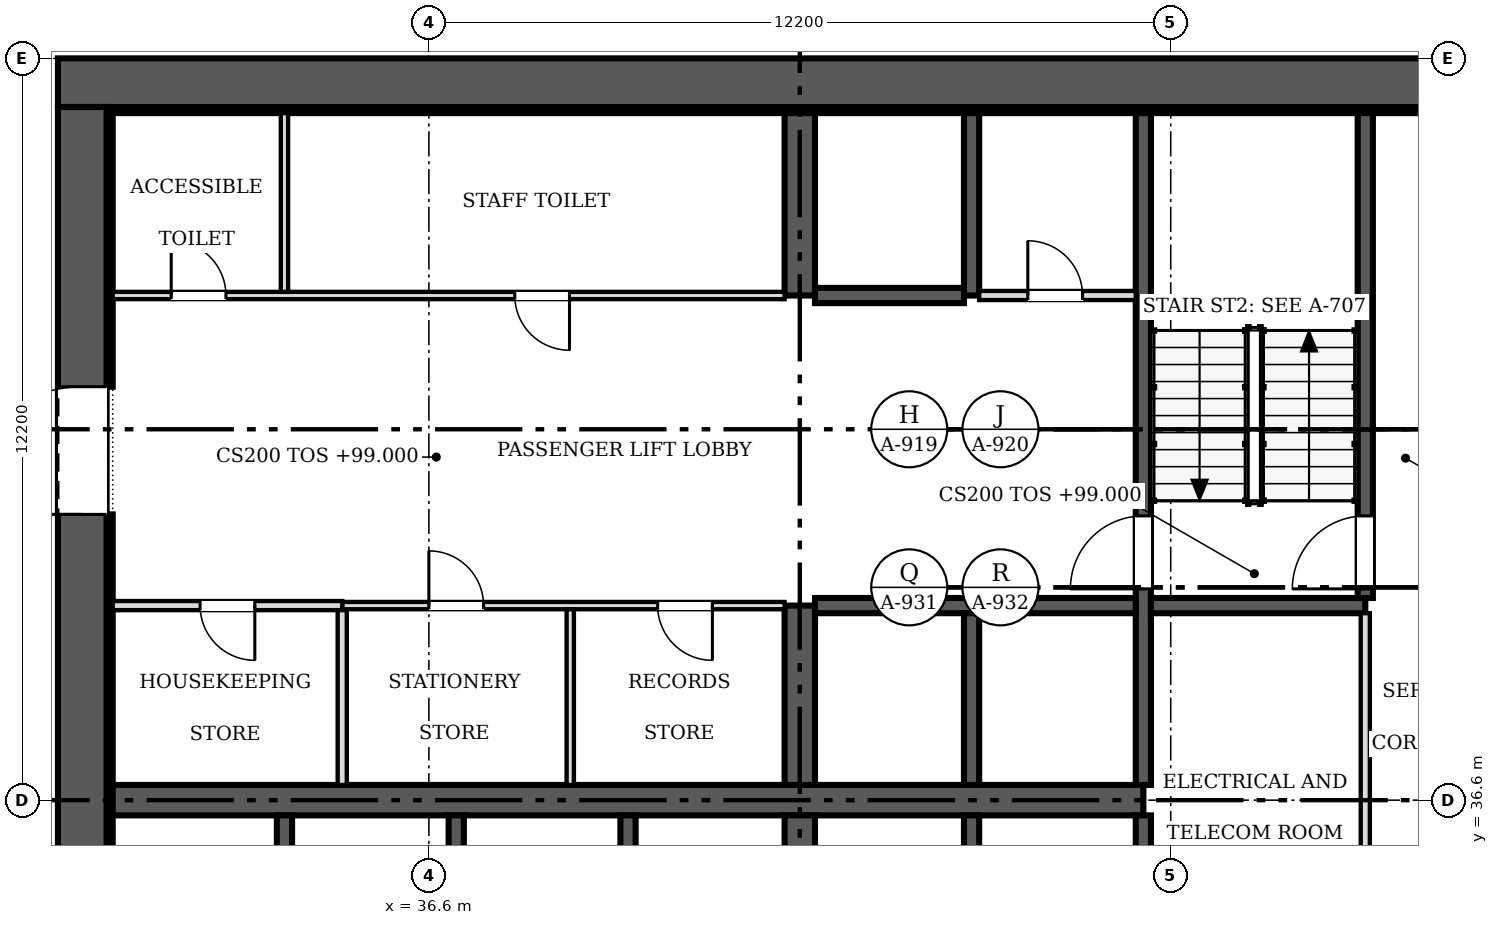
"""IFC4 building model, lengths in metres.
Left out: names, types, materials, properties, quantities, classifications, styles, units other than length and angle.
Written with IfcOpenShell. Run it as: python <this file> out.ifc"""

import sys

from ifc_helpers import new_model, si_unit, direction, frame, frame_2d, origin, place, context, subcontext, project, spatial, rectangle, extrude, source, transform, mapped, element, fill, save


model = new_model("IFC4")
c1 = context("Model", 3, precision=1e-05, world=origin(), true_north=direction((0.0, 1.0)))
c2 = subcontext(c1, "Body", "Model", "MODEL_VIEW")
j1 = project(units=[si_unit("LENGTHUNIT", "METRE"), si_unit("PLANEANGLEUNIT", "RADIAN")], contexts=[c1])
p1 = place(None, origin())
s1 = spatial("IfcSite", under=j1, at=p1, CompositionType="ELEMENT")
p2 = place(p1, origin())
s2 = spatial("IfcBuilding", under=s1, at=p2, CompositionType="ELEMENT")
p3 = place(p2, frame((0.0, 0.0, 99.0)))
s3 = spatial("IfcBuildingStorey", under=s2, at=p3, CompositionType="ELEMENT", Elevation=99.0)
p4 = place(p3, frame((30.9, 25.2, 0.0), z_axis=(0.0, 0.0, 1.0), x_axis=(0.0, 1.0, 0.0)))
e1 = element("IfcWall", 1, at=p4, inside=s3, PredefinedType="SHEAR", context=c2, shape_type="SweptSolid", body=[
    extrude(rectangle(XDim=22.8, YDim=0.8, at=frame_2d((11.4, 0.0))), origin(), (0.0, 0.0, 1.0), 3.8),
])
m1 = source(origin(), c2, "Body", "SweptSolid", [
    extrude(rectangle(XDim=2.1, YDim=2.4, at=frame_2d((1.05, 1.2))), frame((0.0, 0.41, 0.0), z_axis=(0.0, -1.0, 0.0), x_axis=(1.0, 0.0, 0.0)), (0.0, 0.0, 1.0), 0.82),
])
p5 = place(p4, frame((4.6, 0.0, 0.0)))
e2 = element("IfcOpeningElement", 2, at=p5, cuts=e1, PredefinedType="OPENING", context=c2, shape_type="MappedRepresentation", body=[
    mapped(m1, transform((0.0, 0.0, 0.0), scale=1.0)),
])
p6 = place(p4, frame((16.1, 0.0, 0.0)))
e3 = element("IfcOpeningElement", 3, at=p6, cuts=e1, PredefinedType="OPENING", context=c2, shape_type="MappedRepresentation", body=[
    mapped(m1, transform((0.0, 0.0, 0.0), scale=1.0)),
])
p7 = place(p3, frame((30.5, 48.4, 0.0), z_axis=(0.0, 0.0, 1.0), x_axis=(1.0, 0.0, 0.0)))
e4 = element("IfcWall", 4, at=p7, inside=s3, PredefinedType="SHEAR", context=c2, shape_type="SweptSolid", body=[
    extrude(rectangle(XDim=24.4, YDim=0.8, at=frame_2d((12.2, 0.0))), origin(), (0.0, 0.0, 1.0), 3.8),
])
p8 = place(p3, frame((31.3, 47.95, 0.0), z_axis=(0.0, 0.0, 1.0), x_axis=(1.0, 0.0, 0.0)))
e5 = element("IfcWall", 5, at=p8, inside=s3, PredefinedType="SOLIDWALL", context=c2, shape_type="SweptSolid", body=[
    extrude(rectangle(XDim=22.8, YDim=0.1, at=frame_2d((11.4, 0.0))), origin(), (0.0, 0.0, 1.0), 3.8),
])
p9 = place(p3, frame((31.35, 31.9, 0.0), z_axis=(0.0, 0.0, 1.0), x_axis=(0.0, 1.0, 0.0)))
e6 = element("IfcWall", 6, at=p9, inside=s3, PredefinedType="SOLIDWALL", context=c2, shape_type="SweptSolid", body=[
    extrude(rectangle(XDim=9.4, YDim=0.1, at=frame_2d((4.7, 0.0))), origin(), (0.0, 0.0, 1.0), 3.8),
])
p10 = place(p3, frame((31.35, 43.4, 0.0), z_axis=(0.0, 0.0, 1.0), x_axis=(0.0, 1.0, 0.0)))
e7 = element("IfcWall", 7, at=p10, inside=s3, PredefinedType="SOLIDWALL", context=c2, shape_type="SweptSolid", body=[
    extrude(rectangle(XDim=4.5, YDim=0.1, at=frame_2d((2.25, 0.0))), origin(), (0.0, 0.0, 1.0), 3.8),
])
p11 = place(p3, frame((31.4, 36.6, 0.0), z_axis=(0.0, 0.0, 1.0), x_axis=(1.0, 0.0, 0.0)))
e8 = element("IfcWall", 8, at=p11, inside=s3, PredefinedType="SHEAR", context=c2, shape_type="SweptSolid", body=[
    extrude(rectangle(XDim=16.95, YDim=0.5, at=frame_2d((8.475, 0.0))), origin(), (0.0, 0.0, 1.0), 3.8),
])
p12 = place(p3, frame((42.7, 36.35, 0.0), z_axis=(0.0, 0.0, 1.0), x_axis=(0.0, -1.0, 0.0)))
e9 = element("IfcWall", 9, at=p12, inside=s3, PredefinedType="SHEAR", context=c2, shape_type="SweptSolid", body=[
    extrude(rectangle(XDim=11.05, YDim=0.5, at=frame_2d((5.525, 0.0))), origin(), (0.0, 0.0, 1.0), 3.8),
])
m2 = source(origin(), c2, "Body", "SweptSolid", [
    extrude(rectangle(XDim=0.9, YDim=2.1, at=frame_2d((0.45, 1.05))), frame((0.0, 0.26, 0.0), z_axis=(0.0, -1.0, 0.0), x_axis=(1.0, 0.0, 0.0)), (0.0, 0.0, 1.0), 0.52),
])
p13 = place(p12, frame((6.5, 0.0, 0.0)))
e10 = element("IfcOpeningElement", 10, at=p13, cuts=e9, PredefinedType="OPENING", context=c2, shape_type="MappedRepresentation", body=[
    mapped(m2, transform((0.0, 0.0, 0.0), scale=1.0)),
])
m3 = source(origin(), c2, "Body", "SweptSolid", [
    extrude(rectangle(XDim=1.1, YDim=2.1, at=frame_2d((0.55, 1.05))), frame((0.0, 0.26, 0.0), z_axis=(0.0, -1.0, 0.0), x_axis=(1.0, 0.0, 0.0)), (0.0, 0.0, 1.0), 0.52),
])
p14 = place(p12, frame((3.8, 0.0, 0.0)))
e11 = element("IfcOpeningElement", 11, at=p14, cuts=e9, PredefinedType="OPENING", context=c2, shape_type="MappedRepresentation", body=[
    mapped(m3, transform((0.0, 0.0, 0.0), scale=1.0)),
])
p15 = place(p3, frame((42.7, 36.85, 0.0), z_axis=(0.0, 0.0, 1.0), x_axis=(0.0, 1.0, 0.0)))
e12 = element("IfcWall", 12, at=p15, inside=s3, PredefinedType="SHEAR", context=c2, shape_type="SweptSolid", body=[
    extrude(rectangle(XDim=2.95, YDim=0.5, at=frame_2d((1.475, 0.0))), origin(), (0.0, 0.0, 1.0), 3.8),
])
p16 = place(p3, frame((42.7, 44.9, 0.0), z_axis=(0.0, 0.0, 1.0), x_axis=(0.0, 1.0, 0.0)))
e13 = element("IfcWall", 13, at=p16, inside=s3, PredefinedType="SHEAR", context=c2, shape_type="SweptSolid", body=[
    extrude(rectangle(XDim=3.0, YDim=0.5, at=frame_2d((1.5, 0.0))), origin(), (0.0, 0.0, 1.0), 3.8),
])
p17 = place(p3, frame((48.35, 36.35, 0.0), z_axis=(0.0, 0.0, 1.0), x_axis=(0.0, -1.0, 0.0)))
e14 = element("IfcWall", 14, at=p17, inside=s3, PredefinedType="SOLIDWALL", context=c2, shape_type="SweptSolid", body=[
    extrude(rectangle(XDim=11.05, YDim=0.25, at=frame_2d((5.525, 0.0))), origin(), (0.0, 0.0, 1.0), 3.8),
])
m4 = source(origin(), c2, "Body", "SweptSolid", [
    extrude(rectangle(XDim=1.2, YDim=2.1, at=frame_2d((0.6, 1.05))), frame((0.0, 0.135, 0.0), z_axis=(0.0, -1.0, 0.0), x_axis=(1.0, 0.0, 0.0)), (0.0, 0.0, 1.0), 0.27),
])
p18 = place(p17, frame((3.225, 0.0, 0.0)))
e15 = element("IfcOpeningElement", 15, at=p18, cuts=e14, PredefinedType="OPENING", context=c2, shape_type="MappedRepresentation", body=[
    mapped(m4, transform((0.0, 0.0, 0.0), scale=1.0)),
])
p19 = place(p3, frame((48.35, 47.9, 0.0), z_axis=(0.0, 0.0, 1.0), x_axis=(0.0, -1.0, 0.0)))
e16 = element("IfcWall", 16, at=p19, inside=s3, PredefinedType="SOLIDWALL", context=c2, shape_type="SweptSolid", body=[
    extrude(rectangle(XDim=11.05, YDim=0.25, at=frame_2d((5.525, 0.0))), origin(), (0.0, 0.0, 1.0), 3.8),
])
p20 = place(p19, frame((6.625, 0.0, 0.0)))
e17 = element("IfcOpeningElement", 17, at=p20, cuts=e16, PredefinedType="OPENING", context=c2, shape_type="MappedRepresentation", body=[
    mapped(m4, transform((0.0, 0.0, 0.0), scale=1.0)),
])
p21 = place(p3, frame((42.95, 39.8, 0.0), z_axis=(0.0, 0.0, 1.0), x_axis=(1.0, 0.0, 0.0)))
e18 = element("IfcWall", 18, at=p21, inside=s3, PredefinedType="SOLIDWALL", context=c2, shape_type="SweptSolid", body=[
    extrude(rectangle(XDim=5.275, YDim=0.25, at=frame_2d((2.638, 0.0))), origin(), (0.0, 0.0, 1.0), 3.8),
])
p22 = place(p3, frame((48.475, 39.8, 0.0), z_axis=(0.0, 0.0, 1.0), x_axis=(1.0, 0.0, 0.0)))
e19 = element("IfcWall", 19, at=p22, inside=s3, PredefinedType="SOLIDWALL", context=c2, shape_type="SweptSolid", body=[
    extrude(rectangle(XDim=3.525, YDim=0.25, at=frame_2d((1.762, 0.0))), origin(), (0.0, 0.0, 1.0), 3.8),
])
p23 = place(p3, frame((52.0, 39.925, 0.0), z_axis=(0.0, 0.0, 1.0), x_axis=(0.0, 1.0, 0.0)))
e20 = element("IfcWall", 20, at=p23, inside=s3, PredefinedType="SOLIDWALL", context=c2, shape_type="SweptSolid", body=[
    extrude(rectangle(XDim=7.975, YDim=0.25, at=frame_2d((3.987, 0.0))), origin(), (0.0, 0.0, 1.0), 3.8),
])
p24 = place(p23, frame((0.15, 0.0, 0.0)))
e21 = element("IfcOpeningElement", 21, at=p24, cuts=e20, PredefinedType="OPENING", context=c2, shape_type="MappedRepresentation", body=[
    mapped(m4, transform((0.0, 0.0, 0.0), scale=1.0)),
])
p25 = place(p3, frame((45.525, 33.525, 0.0), z_axis=(0.0, 0.0, 1.0), x_axis=(0.0, 1.0, 0.0)))
e22 = element("IfcWall", 22, at=p25, inside=s3, PredefinedType="SOLIDWALL", context=c2, shape_type="SweptSolid", body=[
    extrude(rectangle(XDim=2.825, YDim=0.25, at=frame_2d((1.413, 0.0))), origin(), (0.0, 0.0, 1.0), 3.8),
])
p26 = place(p3, frame((45.525, 36.85, 0.0), z_axis=(0.0, 0.0, 1.0), x_axis=(0.0, 1.0, 0.0)))
e23 = element("IfcWall", 23, at=p26, inside=s3, PredefinedType="SOLIDWALL", context=c2, shape_type="SweptSolid", body=[
    extrude(rectangle(XDim=2.825, YDim=0.25, at=frame_2d((1.413, 0.0))), origin(), (0.0, 0.0, 1.0), 3.8),
])
for number, where, z_axis, x_axis in (
    (24, (34.225, 33.525, 0.0), (0.0, 0.0, 1.0), (0.0, 1.0, 0.0)),
    (25, (37.05, 33.525, 0.0), (0.0, 0.0, 1.0), (0.0, 1.0, 0.0)),
    (26, (39.875, 33.525, 0.0), (0.0, 0.0, 1.0), (0.0, 1.0, 0.0)),
):
    element("IfcWall", number, at=place(p3, frame(where, z_axis=z_axis, x_axis=x_axis)), inside=s3, PredefinedType="SOLIDWALL", context=c2, shape_type="SweptSolid", body=[
        extrude(rectangle(XDim=2.825, YDim=0.25, at=frame_2d((1.413, 0.0))), origin(), (0.0, 0.0, 1.0), 3.8),
    ])
p27 = place(p3, frame((45.525, 44.9, 0.0), z_axis=(0.0, 0.0, 1.0), x_axis=(0.0, 1.0, 0.0)))
e27 = element("IfcWall", 27, at=p27, inside=s3, PredefinedType="SOLIDWALL", context=c2, shape_type="SweptSolid", body=[
    extrude(rectangle(XDim=3.0, YDim=0.25, at=frame_2d((1.5, 0.0))), origin(), (0.0, 0.0, 1.0), 3.8),
])
p28 = place(p3, frame((42.95, 44.9, 0.0), z_axis=(0.0, 0.0, 1.0), x_axis=(1.0, 0.0, 0.0)))
e28 = element("IfcWall", 28, at=p28, inside=s3, PredefinedType="SOLIDWALL", context=c2, shape_type="SweptSolid", body=[
    extrude(rectangle(XDim=2.45, YDim=0.25, at=frame_2d((1.225, 0.0))), origin(), (0.0, 0.0, 1.0), 3.8),
])
p29 = place(p3, frame((31.4, 44.9, 0.0), z_axis=(0.0, 0.0, 1.0), x_axis=(1.0, 0.0, 0.0)))
e29 = element("IfcWall", 29, at=p29, inside=s3, PredefinedType="PARTITIONING", context=c2, shape_type="SweptSolid", body=[
    extrude(rectangle(XDim=11.05, YDim=0.12, at=frame_2d((5.525, 0.0))), origin(), (0.0, 0.0, 1.0), 3.6),
])
m5 = source(origin(), c2, "Body", "SweptSolid", [
    extrude(rectangle(XDim=0.9, YDim=2.1, at=frame_2d((0.45, 1.05))), frame((0.0, 0.07, 0.0), z_axis=(0.0, -1.0, 0.0), x_axis=(1.0, 0.0, 0.0)), (0.0, 0.0, 1.0), 0.14),
])
p30 = place(p29, frame((0.962, 0.0, 0.0)))
e30 = element("IfcOpeningElement", 30, at=p30, cuts=e29, PredefinedType="OPENING", context=c2, shape_type="MappedRepresentation", body=[
    mapped(m5, transform((0.0, 0.0, 0.0), scale=1.0)),
])
p31 = place(p29, frame((6.613, 0.0, 0.0)))
e31 = element("IfcOpeningElement", 31, at=p31, cuts=e29, PredefinedType="OPENING", context=c2, shape_type="MappedRepresentation", body=[
    mapped(m5, transform((0.0, 0.0, 0.0), scale=1.0)),
])
p32 = place(p3, frame((42.45, 39.8, 0.0), z_axis=(0.0, 0.0, 1.0), x_axis=(-1.0, 0.0, 0.0)))
e32 = element("IfcWall", 32, at=p32, inside=s3, PredefinedType="PARTITIONING", context=c2, shape_type="SweptSolid", body=[
    extrude(rectangle(XDim=7.275, YDim=0.12, at=frame_2d((3.637, 0.0))), origin(), (0.0, 0.0, 1.0), 3.6),
])
p33 = place(p32, frame((4.95, 0.0, 0.0)))
e33 = element("IfcOpeningElement", 33, at=p33, cuts=e32, PredefinedType="OPENING", context=c2, shape_type="MappedRepresentation", body=[
    mapped(m5, transform((0.0, 0.0, 0.0), scale=1.0)),
])
p34 = place(p32, frame((1.188, 0.0, 0.0)))
e34 = element("IfcOpeningElement", 34, at=p34, cuts=e32, PredefinedType="OPENING", context=c2, shape_type="MappedRepresentation", body=[
    mapped(m5, transform((0.0, 0.0, 0.0), scale=1.0)),
])
p35 = place(p3, frame((52.0, 33.525, 0.0), z_axis=(0.0, 0.0, 1.0), x_axis=(0.0, 1.0, 0.0)))
e35 = element("IfcWall", 35, at=p35, inside=s3, PredefinedType="PARTITIONING", context=c2, shape_type="SweptSolid", body=[
    extrude(rectangle(XDim=6.15, YDim=0.15, at=frame_2d((3.075, 0.0))), origin(), (0.0, 0.0, 1.0), 3.6),
])
m6 = source(origin(), c2, "Body", "SweptSolid", [
    extrude(rectangle(XDim=0.9, YDim=2.1, at=frame_2d((0.45, 1.05))), frame((0.0, 0.085, 0.0), z_axis=(0.0, -1.0, 0.0), x_axis=(1.0, 0.0, 0.0)), (0.0, 0.0, 1.0), 0.17),
])
p36 = place(p35, frame((1.025, 0.0, 0.0)))
e36 = element("IfcOpeningElement", 36, at=p36, cuts=e35, PredefinedType="OPENING", context=c2, shape_type="MappedRepresentation", body=[
    mapped(m6, transform((0.0, 0.0, 0.0), scale=1.0)),
])
p37 = place(p3, frame((35.175, 39.8, 0.0), z_axis=(0.0, 0.0, 1.0), x_axis=(-1.0, 0.0, 0.0)))
e37 = element("IfcWall", 37, at=p37, inside=s3, PredefinedType="PARTITIONING", context=c2, shape_type="SweptSolid", body=[
    extrude(rectangle(XDim=3.775, YDim=0.15, at=frame_2d((1.888, 0.0))), origin(), (0.0, 0.0, 1.0), 3.6),
])
p38 = place(p37, frame((1.438, 0.0, 0.0)))
e38 = element("IfcOpeningElement", 38, at=p38, cuts=e37, PredefinedType="OPENING", context=c2, shape_type="MappedRepresentation", body=[
    mapped(m6, transform((0.0, 0.0, 0.0), scale=1.0)),
])
p39 = place(p3, frame((35.175, 36.85, 0.0), z_axis=(0.0, 0.0, 1.0), x_axis=(0.0, 1.0, 0.0)))
e39 = element("IfcWall", 39, at=p39, inside=s3, PredefinedType="PARTITIONING", context=c2, shape_type="SweptSolid", body=[
    extrude(rectangle(XDim=2.875, YDim=0.15, at=frame_2d((1.438, 0.0))), origin(), (0.0, 0.0, 1.0), 3.6),
])
p40 = place(p3, frame((38.925, 36.85, 0.0), z_axis=(0.0, 0.0, 1.0), x_axis=(0.0, 1.0, 0.0)))
e40 = element("IfcWall", 40, at=p40, inside=s3, PredefinedType="PARTITIONING", context=c2, shape_type="SweptSolid", body=[
    extrude(rectangle(XDim=2.89, YDim=0.12, at=frame_2d((1.445, 0.0))), origin(), (0.0, 0.0, 1.0), 3.6),
])
p41 = place(p3, frame((34.225, 44.96, 0.0), z_axis=(0.0, 0.0, 1.0), x_axis=(0.0, 1.0, 0.0)))
e41 = element("IfcWall", 41, at=p41, inside=s3, PredefinedType="PARTITIONING", context=c2, shape_type="SweptSolid", body=[
    extrude(rectangle(XDim=2.94, YDim=0.12, at=frame_2d((1.47, 0.0))), origin(), (0.0, 0.0, 1.0), 3.6),
])
p42 = place(p3, frame((45.65, 44.9, 0.0), z_axis=(0.0, 0.0, 1.0), x_axis=(1.0, 0.0, 0.0)))
e42 = element("IfcWall", 42, at=p42, inside=s3, PredefinedType="PARTITIONING", context=c2, shape_type="SweptSolid", body=[
    extrude(rectangle(XDim=2.575, YDim=0.15, at=frame_2d((1.288, 0.0))), origin(), (0.0, 0.0, 1.0), 3.6),
])
p43 = place(p42, frame((0.8, 0.0, 0.0)))
e43 = element("IfcOpeningElement", 43, at=p43, cuts=e42, PredefinedType="OPENING", context=c2, shape_type="MappedRepresentation", body=[
    mapped(m6, transform((0.0, 0.0, 0.0), scale=1.0)),
])
m7 = source(origin(), c2, "Body", "SweptSolid", [
    extrude(rectangle(XDim=2.1, YDim=2.4, at=frame_2d((1.05, 1.2))), frame((0.0, 0.025, 0.0), z_axis=(0.0, -1.0, 0.0), x_axis=(1.0, 0.0, 0.0)), (0.0, 0.0, 1.0), 0.05),
])
p44 = place(p6, origin())
e44 = element("IfcDoor", 44, at=p44, inside=s3, OperationType="DOUBLE_DOOR_SINGLE_SWING", PredefinedType="DOOR", context=c2, shape_type="MappedRepresentation", body=[
    mapped(m7, transform((0.0, 0.0, 0.0), scale=1.0)),
])
fill(e3, e44)
m8 = source(origin(), c2, "Body", "SweptSolid", [
    extrude(rectangle(XDim=1.2, YDim=2.1, at=frame_2d((0.6, 1.05))), frame((0.0, 0.025, 0.0), z_axis=(0.0, -1.0, 0.0), x_axis=(1.0, 0.0, 0.0)), (0.0, 0.0, 1.0), 0.05),
])
p45 = place(p20, origin())
e45 = element("IfcDoor", 45, at=p45, inside=s3, OperationType="SINGLE_SWING_RIGHT", PredefinedType="DOOR", context=c2, shape_type="MappedRepresentation", body=[
    mapped(m8, transform((0.0, 0.0, 0.0), scale=1.0)),
])
fill(e17, e45)
p46 = place(p24, origin())
e46 = element("IfcDoor", 46, at=p46, inside=s3, OperationType="SINGLE_SWING_LEFT", PredefinedType="DOOR", context=c2, shape_type="MappedRepresentation", body=[
    mapped(m8, transform((0.0, 0.0, 0.0), scale=1.0)),
])
fill(e21, e46)
m9 = source(origin(), c2, "Body", "SweptSolid", [
    extrude(rectangle(XDim=0.9, YDim=2.1, at=frame_2d((0.45, 1.05))), frame((0.0, 0.025, 0.0), z_axis=(0.0, -1.0, 0.0), x_axis=(1.0, 0.0, 0.0)), (0.0, 0.0, 1.0), 0.05),
])
p47 = place(p30, origin())
e47 = element("IfcDoor", 47, at=p47, inside=s3, OperationType="SINGLE_SWING_LEFT", PredefinedType="DOOR", context=c2, shape_type="MappedRepresentation", body=[
    mapped(m9, transform((0.0, 0.0, 0.0), scale=1.0)),
])
fill(e30, e47)
p48 = place(p31, origin())
e48 = element("IfcDoor", 48, at=p48, inside=s3, OperationType="SINGLE_SWING_RIGHT", PredefinedType="DOOR", context=c2, shape_type="MappedRepresentation", body=[
    mapped(m9, transform((0.0, 0.0, 0.0), scale=1.0)),
])
fill(e31, e48)
p49 = place(p33, origin())
e49 = element("IfcDoor", 49, at=p49, inside=s3, OperationType="SINGLE_SWING_RIGHT", PredefinedType="DOOR", context=c2, shape_type="MappedRepresentation", body=[
    mapped(m9, transform((0.0, 0.0, 0.0), scale=1.0)),
])
fill(e33, e49)
p50 = place(p34, origin())
e50 = element("IfcDoor", 50, at=p50, inside=s3, OperationType="SINGLE_SWING_LEFT", PredefinedType="DOOR", context=c2, shape_type="MappedRepresentation", body=[
    mapped(m9, transform((0.0, 0.0, 0.0), scale=1.0)),
])
fill(e34, e50)
p51 = place(p38, origin())
e51 = element("IfcDoor", 51, at=p51, inside=s3, OperationType="SINGLE_SWING_LEFT", PredefinedType="DOOR", context=c2, shape_type="MappedRepresentation", body=[
    mapped(m9, transform((0.0, 0.0, 0.0), scale=1.0)),
])
fill(e38, e51)
p52 = place(p43, origin())
e52 = element("IfcDoor", 52, at=p52, inside=s3, OperationType="SINGLE_SWING_LEFT", PredefinedType="DOOR", context=c2, shape_type="MappedRepresentation", body=[
    mapped(m9, transform((0.0, 0.0, 0.0), scale=1.0)),
])
fill(e43, e52)
save(model, sys.argv[1])
